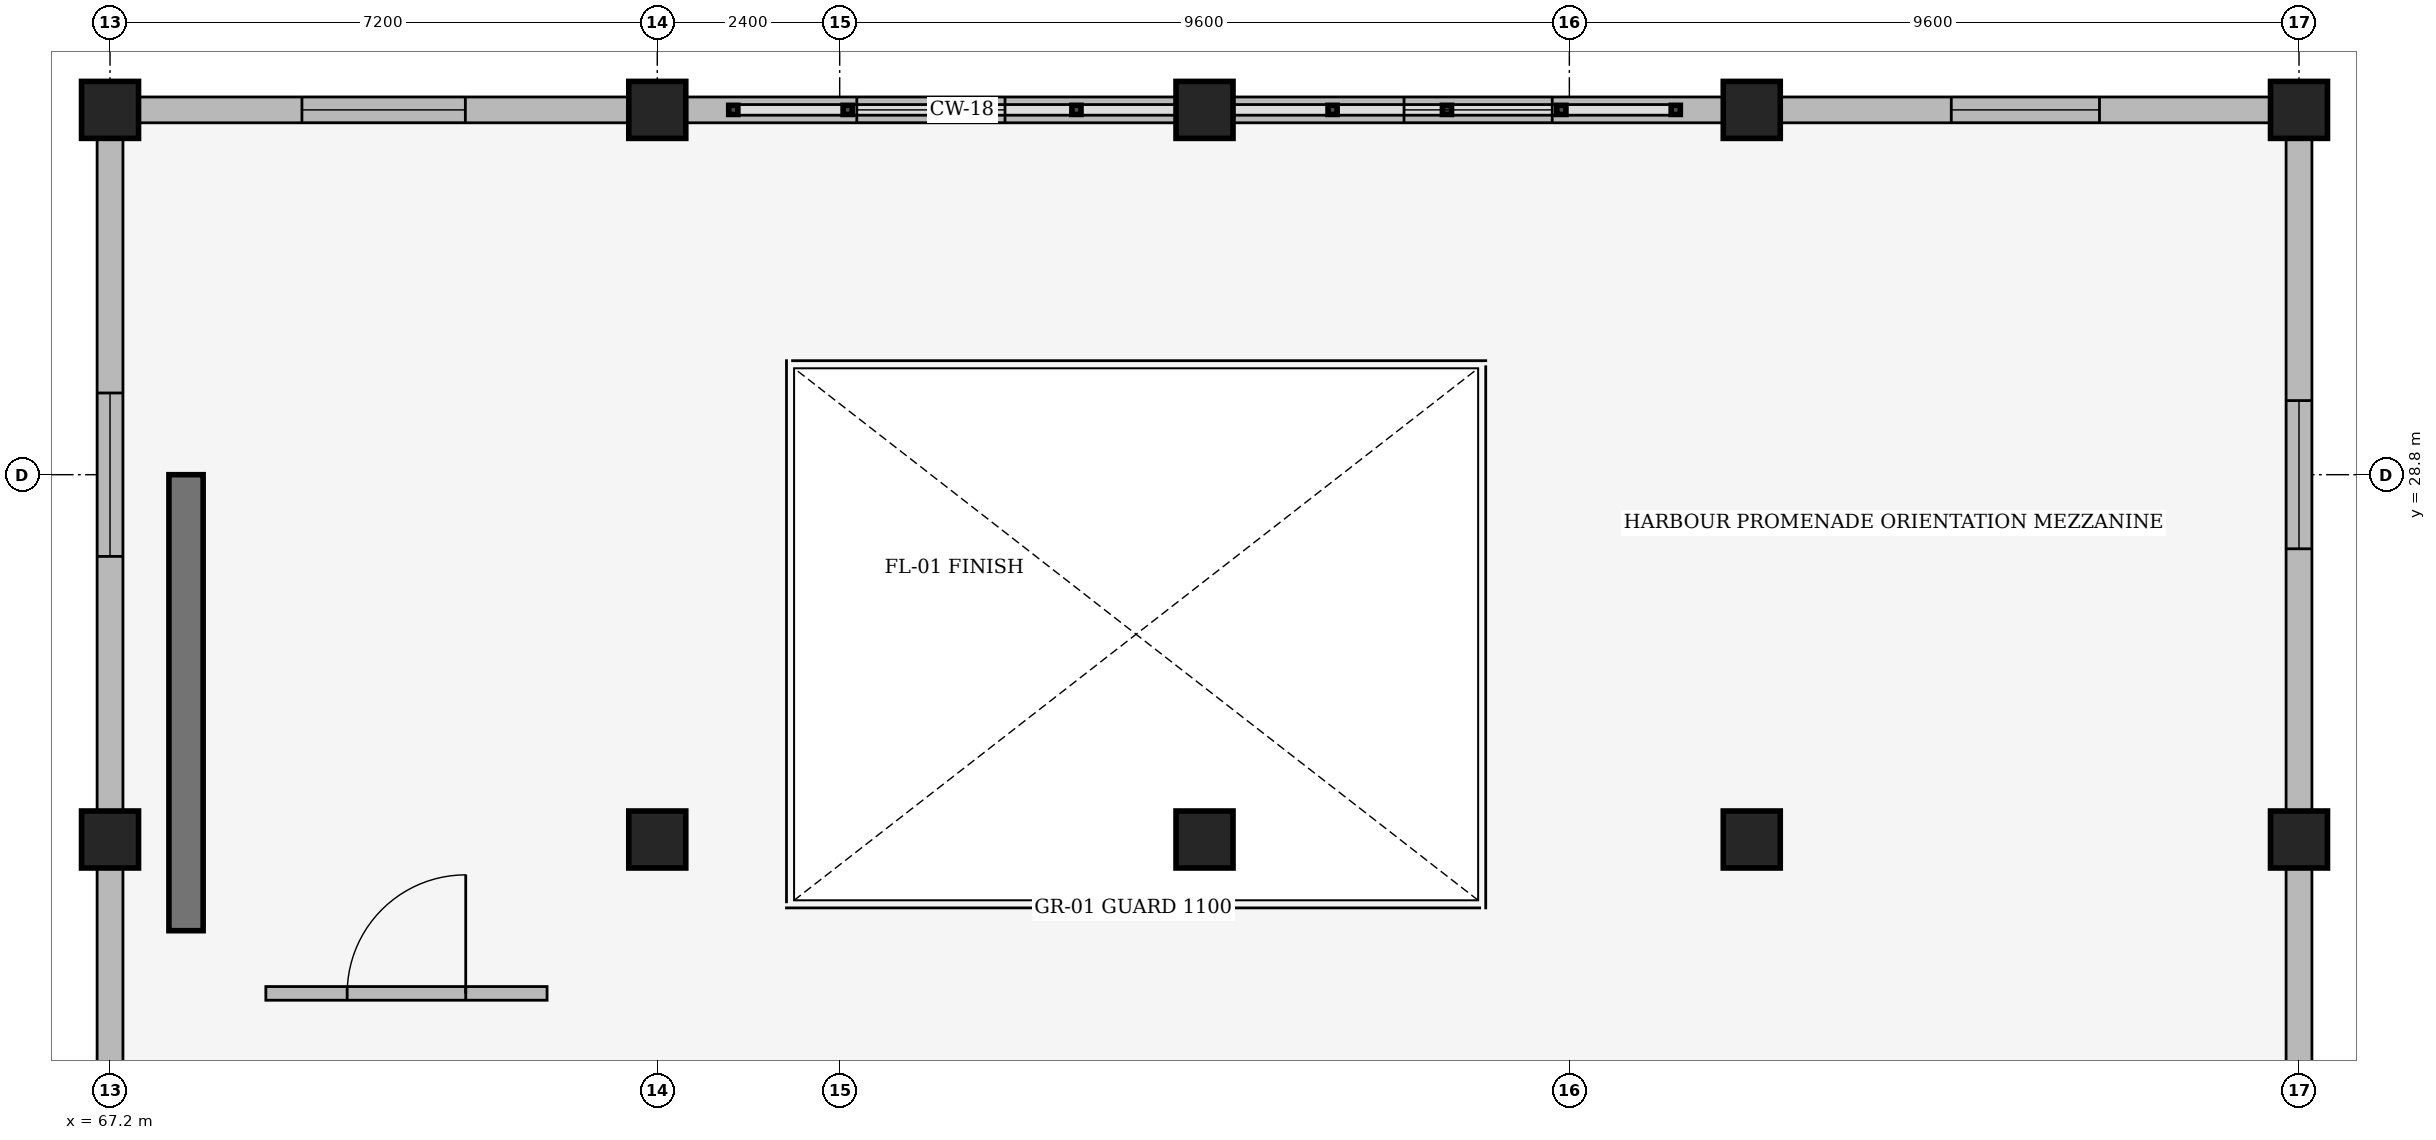
"""IFC4 building model, lengths in metres.
Left out: names, types, materials, properties, quantities, classifications, styles, units other than length and angle.
Written with IfcOpenShell. Run it as: python <this file> out.ifc"""

import sys

from ifc_helpers import new_model, si_unit, direction, frame, frame_2d, origin, origin_2d, place, context, subcontext, project, spatial, rectangle, extrude, element, fill, save


model = new_model("IFC4")
c1 = context("Model", 3, precision=1e-05, world=origin(), true_north=direction((0.0, 1.0)))
c2 = subcontext(c1, "Body", "Model", "MODEL_VIEW")
j1 = project(units=[si_unit("LENGTHUNIT", "METRE"), si_unit("PLANEANGLEUNIT", "RADIAN")], contexts=[c1])
p1 = place(None, origin())
s1 = spatial("IfcSite", under=j1, at=p1, CompositionType="ELEMENT")
p2 = place(p1, origin())
s2 = spatial("IfcBuilding", under=s1, at=p2, CompositionType="ELEMENT")
p3 = place(p2, frame((0.0, 0.0, 5.4)))
s3 = spatial("IfcBuildingStorey", under=s2, at=p3, CompositionType="ELEMENT", Elevation=5.4)
for number, where, z_axis, x_axis in (
    (1, (67.2, 24.0, 0.0), (0.0, 0.0, 1.0), (1.0, 0.0, 0.0)),
    (2, (67.2, 33.6, 0.0), (0.0, 0.0, 1.0), (1.0, 0.0, 0.0)),
    (3, (74.4, 24.0, 0.0), (0.0, 0.0, 1.0), (1.0, 0.0, 0.0)),
    (4, (74.4, 33.6, 0.0), (0.0, 0.0, 1.0), (1.0, 0.0, 0.0)),
    (5, (81.6, 24.0, 0.0), (0.0, 0.0, 1.0), (1.0, 0.0, 0.0)),
    (6, (81.6, 33.6, 0.0), (0.0, 0.0, 1.0), (1.0, 0.0, 0.0)),
    (7, (88.8, 24.0, 0.0), (0.0, 0.0, 1.0), (1.0, 0.0, 0.0)),
    (8, (88.8, 33.6, 0.0), (0.0, 0.0, 1.0), (1.0, 0.0, 0.0)),
    (9, (96.0, 24.0, 0.0), (0.0, 0.0, 1.0), (1.0, 0.0, 0.0)),
    (10, (96.0, 33.6, 0.0), (0.0, 0.0, 1.0), (1.0, 0.0, 0.0)),
):
    element("IfcColumn", number, at=place(p3, frame(where, z_axis=z_axis, x_axis=x_axis)), inside=s3, PredefinedType="COLUMN", context=c2, shape_type="SweptSolid", body=[
        extrude(rectangle(XDim=0.75, YDim=0.75, at=origin_2d()), origin(), (0.0, 0.0, 1.0), 5.1),
    ])
p4 = place(p3, frame((68.2, 22.8, 0.0), z_axis=(0.0, 0.0, 1.0), x_axis=(0.0, 1.0, 0.0)))
e11 = element("IfcWall", 11, at=p4, inside=s3, PredefinedType="SHEAR", context=c2, shape_type="SweptSolid", body=[
    extrude(rectangle(XDim=6.0, YDim=0.45, at=frame_2d((3.0, 0.0))), origin(), (0.0, 0.0, 1.0), 5.1),
])
p5 = place(p3, frame((96.0, 14.783, 0.0), z_axis=(0.0, 0.0, 1.0), x_axis=(0.0, 1.0, 0.0)))
e12 = element("IfcWall", 12, at=p5, inside=s3, PredefinedType="SOLIDWALL", context=c2, shape_type="SweptSolid", body=[
    extrude(rectangle(XDim=8.834, YDim=0.34, at=frame_2d((4.417, 0.0))), origin(), (0.0, 0.0, 1.0), 4.606),
])
p6 = place(p5, frame((3.542, 0.0, 0.95)))
e13 = element("IfcOpeningElement", 13, at=p6, cuts=e12, PredefinedType="OPENING", context=c2, shape_type="SweptSolid", body=[
    extrude(rectangle(XDim=1.75, YDim=2.1, at=frame_2d((0.875, 1.05))), frame((0.0, 0.18, 0.0), z_axis=(0.0, -1.0, 0.0), x_axis=(1.0, 0.0, 0.0)), (0.0, 0.0, 1.0), 0.36),
])
p7 = place(p3, frame((96.0, 24.383, 0.0), z_axis=(0.0, 0.0, 1.0), x_axis=(0.0, 1.0, 0.0)))
e14 = element("IfcWall", 14, at=p7, inside=s3, PredefinedType="SOLIDWALL", context=c2, shape_type="SweptSolid", body=[
    extrude(rectangle(XDim=8.834, YDim=0.34, at=frame_2d((4.417, 0.0))), origin(), (0.0, 0.0, 1.0), 4.606),
])
p8 = place(p7, frame((3.442, 0.0, 0.95)))
e15 = element("IfcOpeningElement", 15, at=p8, cuts=e14, PredefinedType="OPENING", context=c2, shape_type="SweptSolid", body=[
    extrude(rectangle(XDim=1.95, YDim=1.2, at=frame_2d((0.975, 0.6))), frame((0.0, 0.18, 0.0), z_axis=(0.0, -1.0, 0.0), x_axis=(1.0, 0.0, 0.0)), (0.0, 0.0, 1.0), 0.36),
])
p9 = place(p3, frame((95.617, 33.6, 0.0), z_axis=(0.0, 0.0, 1.0), x_axis=(-1.0, 0.0, 0.0)))
e16 = element("IfcWall", 16, at=p9, inside=s3, PredefinedType="SOLIDWALL", context=c2, shape_type="SweptSolid", body=[
    extrude(rectangle(XDim=6.434, YDim=0.34, at=frame_2d((3.217, 0.0))), origin(), (0.0, 0.0, 1.0), 4.606),
])
p10 = place(p9, frame((2.242, 0.0, 0.95)))
e17 = element("IfcOpeningElement", 17, at=p10, cuts=e16, PredefinedType="OPENING", context=c2, shape_type="SweptSolid", body=[
    extrude(rectangle(XDim=1.95, YDim=1.5, at=frame_2d((0.975, 0.75))), frame((0.0, 0.18, 0.0), z_axis=(0.0, -1.0, 0.0), x_axis=(1.0, 0.0, 0.0)), (0.0, 0.0, 1.0), 0.36),
])
p11 = place(p3, frame((88.417, 33.6, 0.0), z_axis=(0.0, 0.0, 1.0), x_axis=(-1.0, 0.0, 0.0)))
e18 = element("IfcWall", 18, at=p11, inside=s3, PredefinedType="SOLIDWALL", context=c2, shape_type="SweptSolid", body=[
    extrude(rectangle(XDim=6.434, YDim=0.34, at=frame_2d((3.217, 0.0))), origin(), (0.0, 0.0, 1.0), 4.606),
])
p12 = place(p11, frame((2.242, 0.0, 0.95)))
e19 = element("IfcOpeningElement", 19, at=p12, cuts=e18, PredefinedType="OPENING", context=c2, shape_type="SweptSolid", body=[
    extrude(rectangle(XDim=1.95, YDim=1.8, at=frame_2d((0.975, 0.9))), frame((0.0, 0.18, 0.0), z_axis=(0.0, -1.0, 0.0), x_axis=(1.0, 0.0, 0.0)), (0.0, 0.0, 1.0), 0.36),
])
p13 = place(p3, frame((81.217, 33.6, 0.0), z_axis=(0.0, 0.0, 1.0), x_axis=(-1.0, 0.0, 0.0)))
e20 = element("IfcWall", 20, at=p13, inside=s3, PredefinedType="SOLIDWALL", context=c2, shape_type="SweptSolid", body=[
    extrude(rectangle(XDim=6.434, YDim=0.34, at=frame_2d((3.217, 0.0))), origin(), (0.0, 0.0, 1.0), 4.606),
])
p14 = place(p13, frame((2.242, 0.0, 0.95)))
e21 = element("IfcOpeningElement", 21, at=p14, cuts=e20, PredefinedType="OPENING", context=c2, shape_type="SweptSolid", body=[
    extrude(rectangle(XDim=1.95, YDim=2.1, at=frame_2d((0.975, 1.05))), frame((0.0, 0.18, 0.0), z_axis=(0.0, -1.0, 0.0), x_axis=(1.0, 0.0, 0.0)), (0.0, 0.0, 1.0), 0.36),
])
p15 = place(p3, frame((74.017, 33.6, 0.0), z_axis=(0.0, 0.0, 1.0), x_axis=(-1.0, 0.0, 0.0)))
e22 = element("IfcWall", 22, at=p15, inside=s3, PredefinedType="SOLIDWALL", context=c2, shape_type="SweptSolid", body=[
    extrude(rectangle(XDim=6.434, YDim=0.34, at=frame_2d((3.217, 0.0))), origin(), (0.0, 0.0, 1.0), 4.606),
])
p16 = place(p15, frame((2.142, 0.0, 0.95)))
e23 = element("IfcOpeningElement", 23, at=p16, cuts=e22, PredefinedType="OPENING", context=c2, shape_type="SweptSolid", body=[
    extrude(rectangle(XDim=2.15, YDim=1.2, at=frame_2d((1.075, 0.6))), frame((0.0, 0.18, 0.0), z_axis=(0.0, -1.0, 0.0), x_axis=(1.0, 0.0, 0.0)), (0.0, 0.0, 1.0), 0.36),
])
p17 = place(p3, frame((67.2, 33.217, 0.0), z_axis=(0.0, 0.0, 1.0), x_axis=(0.0, -1.0, 0.0)))
e24 = element("IfcWall", 24, at=p17, inside=s3, PredefinedType="SOLIDWALL", context=c2, shape_type="SweptSolid", body=[
    extrude(rectangle(XDim=8.834, YDim=0.34, at=frame_2d((4.417, 0.0))), origin(), (0.0, 0.0, 1.0), 4.606),
])
p18 = place(p17, frame((3.342, 0.0, 0.95)))
e25 = element("IfcOpeningElement", 25, at=p18, cuts=e24, PredefinedType="OPENING", context=c2, shape_type="SweptSolid", body=[
    extrude(rectangle(XDim=2.15, YDim=1.5, at=frame_2d((1.075, 0.75))), frame((0.0, 0.18, 0.0), z_axis=(0.0, -1.0, 0.0), x_axis=(1.0, 0.0, 0.0)), (0.0, 0.0, 1.0), 0.36),
])
p19 = place(p3, frame((67.2, 23.617, 0.0), z_axis=(0.0, 0.0, 1.0), x_axis=(0.0, -1.0, 0.0)))
e26 = element("IfcWall", 26, at=p19, inside=s3, PredefinedType="SOLIDWALL", context=c2, shape_type="SweptSolid", body=[
    extrude(rectangle(XDim=8.834, YDim=0.34, at=frame_2d((4.417, 0.0))), origin(), (0.0, 0.0, 1.0), 4.606),
])
p20 = place(p19, frame((3.342, 0.0, 0.95)))
e27 = element("IfcOpeningElement", 27, at=p20, cuts=e26, PredefinedType="OPENING", context=c2, shape_type="SweptSolid", body=[
    extrude(rectangle(XDim=2.15, YDim=1.8, at=frame_2d((1.075, 0.9))), frame((0.0, 0.18, 0.0), z_axis=(0.0, -1.0, 0.0), x_axis=(1.0, 0.0, 0.0)), (0.0, 0.0, 1.0), 0.36),
])
p21 = place(p3, frame((69.25, 21.975, 0.0), z_axis=(0.0, 0.0, 1.0), x_axis=(1.0, 0.0, 0.0)))
e28 = element("IfcWall", 28, at=p21, inside=s3, PredefinedType="PARTITIONING", context=c2, shape_type="SweptSolid", body=[
    extrude(rectangle(XDim=3.7, YDim=0.18, at=frame_2d((1.85, 0.0))), origin(), (0.0, 0.0, 1.0), 4.74),
])
p22 = place(p21, frame((1.07, 0.0, 0.0)))
e29 = element("IfcOpeningElement", 29, at=p22, cuts=e28, PredefinedType="OPENING", context=c2, shape_type="SweptSolid", body=[
    extrude(rectangle(XDim=1.56, YDim=2.32, at=frame_2d((0.78, 1.16))), frame((0.0, 0.1, 0.0), z_axis=(0.0, -1.0, 0.0), x_axis=(1.0, 0.0, 0.0)), (0.0, 0.0, 1.0), 0.2),
])
p23 = place(p8, origin())
e30 = element("IfcWindow", 30, at=p23, inside=s3, PartitioningType="SINGLE_PANEL", PredefinedType="WINDOW", context=c2, shape_type="SweptSolid", body=[
    extrude(rectangle(XDim=1.95, YDim=1.2, at=frame_2d((0.975, 0.6))), frame((0.0, 0.03, 0.0), z_axis=(0.0, -1.0, 0.0), x_axis=(1.0, 0.0, 0.0)), (0.0, 0.0, 1.0), 0.06),
])
fill(e15, e30)
p24 = place(p10, origin())
e31 = element("IfcWindow", 31, at=p24, inside=s3, PartitioningType="SINGLE_PANEL", PredefinedType="WINDOW", context=c2, shape_type="SweptSolid", body=[
    extrude(rectangle(XDim=1.95, YDim=1.5, at=frame_2d((0.975, 0.75))), frame((0.0, 0.03, 0.0), z_axis=(0.0, -1.0, 0.0), x_axis=(1.0, 0.0, 0.0)), (0.0, 0.0, 1.0), 0.06),
])
fill(e17, e31)
p25 = place(p12, origin())
e32 = element("IfcWindow", 32, at=p25, inside=s3, PartitioningType="SINGLE_PANEL", PredefinedType="WINDOW", context=c2, shape_type="SweptSolid", body=[
    extrude(rectangle(XDim=1.95, YDim=1.8, at=frame_2d((0.975, 0.9))), frame((0.0, 0.03, 0.0), z_axis=(0.0, -1.0, 0.0), x_axis=(1.0, 0.0, 0.0)), (0.0, 0.0, 1.0), 0.06),
])
fill(e19, e32)
p26 = place(p14, origin())
e33 = element("IfcWindow", 33, at=p26, inside=s3, PartitioningType="SINGLE_PANEL", PredefinedType="WINDOW", context=c2, shape_type="SweptSolid", body=[
    extrude(rectangle(XDim=1.95, YDim=2.1, at=frame_2d((0.975, 1.05))), frame((0.0, 0.03, 0.0), z_axis=(0.0, -1.0, 0.0), x_axis=(1.0, 0.0, 0.0)), (0.0, 0.0, 1.0), 0.06),
])
fill(e21, e33)
p27 = place(p16, origin())
e34 = element("IfcWindow", 34, at=p27, inside=s3, PartitioningType="SINGLE_PANEL", PredefinedType="WINDOW", context=c2, shape_type="SweptSolid", body=[
    extrude(rectangle(XDim=2.15, YDim=1.2, at=frame_2d((1.075, 0.6))), frame((0.0, 0.03, 0.0), z_axis=(0.0, -1.0, 0.0), x_axis=(1.0, 0.0, 0.0)), (0.0, 0.0, 1.0), 0.06),
])
fill(e23, e34)
p28 = place(p18, origin())
e35 = element("IfcWindow", 35, at=p28, inside=s3, PartitioningType="SINGLE_PANEL", PredefinedType="WINDOW", context=c2, shape_type="SweptSolid", body=[
    extrude(rectangle(XDim=2.15, YDim=1.5, at=frame_2d((1.075, 0.75))), frame((0.0, 0.03, 0.0), z_axis=(0.0, -1.0, 0.0), x_axis=(1.0, 0.0, 0.0)), (0.0, 0.0, 1.0), 0.06),
])
fill(e25, e35)
p29 = place(p22, origin())
e36 = element("IfcDoor", 36, at=p29, inside=s3, OperationType="SINGLE_SWING_RIGHT", PredefinedType="DOOR", context=c2, shape_type="SweptSolid", body=[
    extrude(rectangle(XDim=1.56, YDim=2.32, at=frame_2d((0.78, 1.16))), frame((0.0, 0.025, 0.0), z_axis=(0.0, -1.0, 0.0), x_axis=(1.0, 0.0, 0.0)), (0.0, 0.0, 1.0), 0.05),
])
fill(e29, e36)
save(model, sys.argv[1])
